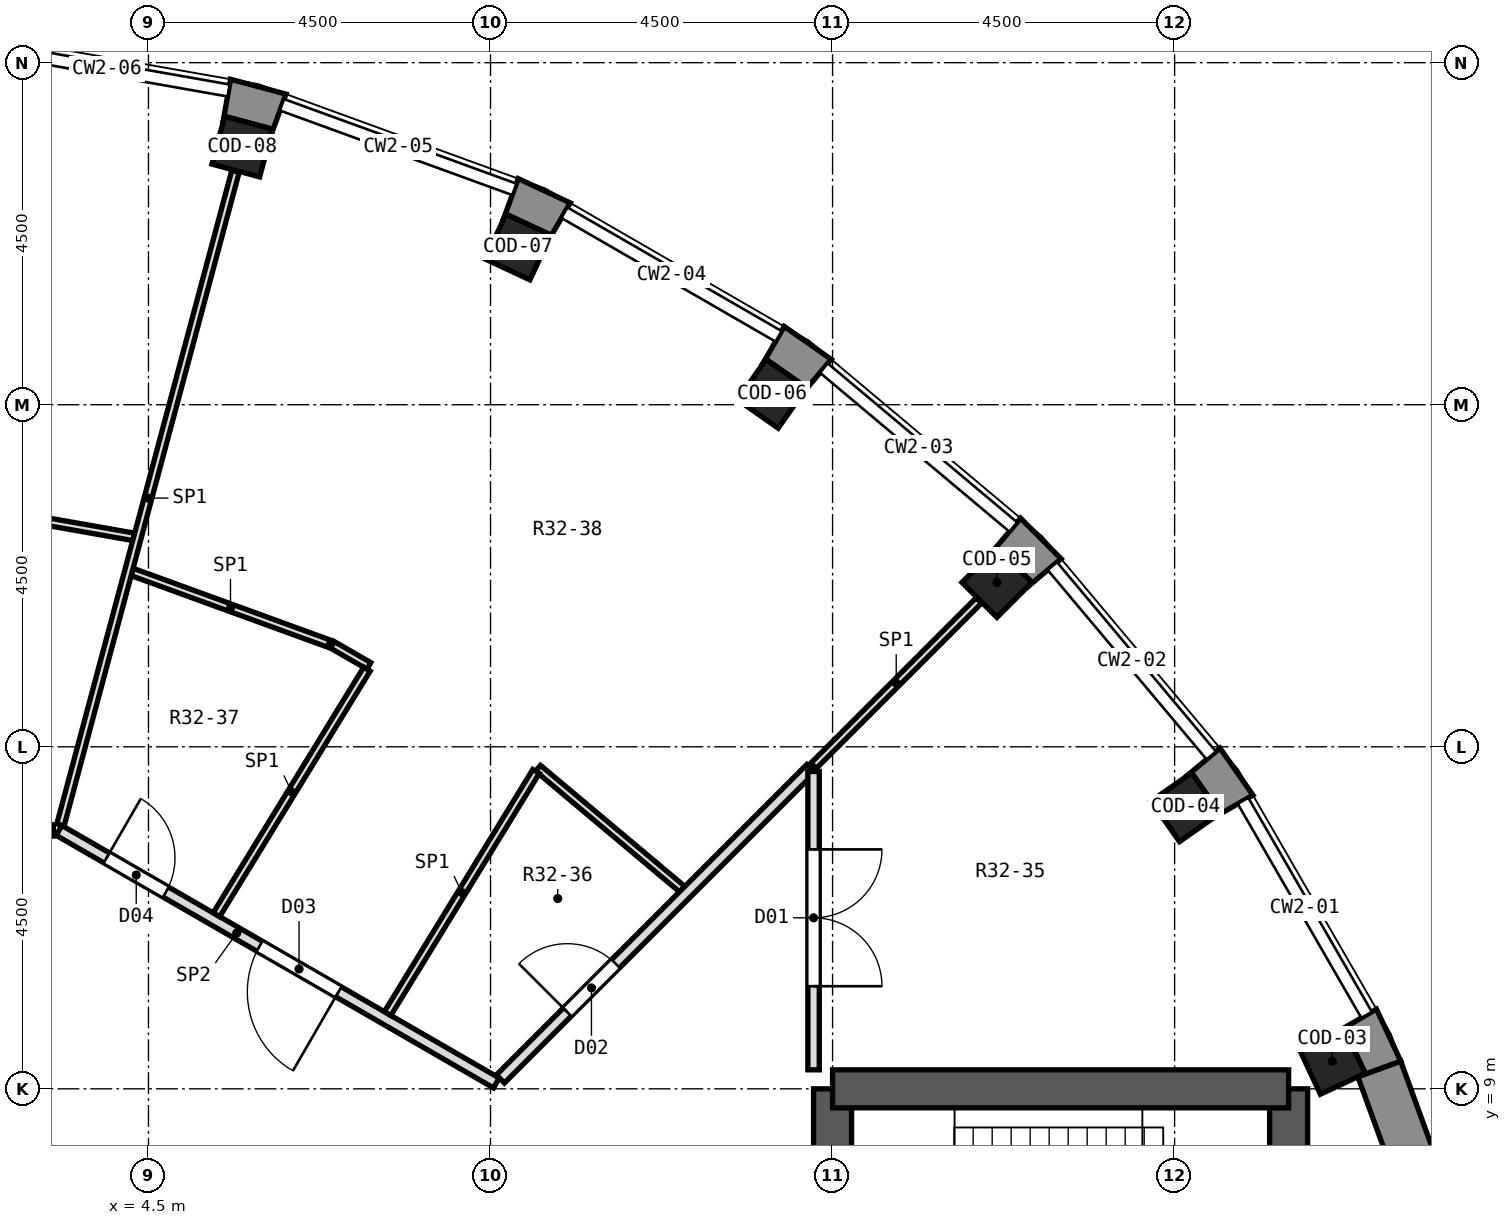
"""IFC4 building model, lengths in metres.
Left out: names, types, materials, properties, quantities, classifications, styles, units other than length and angle.
Written with IfcOpenShell. Run it as: python <this file> out.ifc"""

import sys

from ifc_helpers import new_model, si_unit, direction, frame, frame_2d, origin, origin_2d, place, context, subcontext, project, spatial, polyline, rectangle, outline, extrude, element, fill, save


model = new_model("IFC4")
c1 = context("Model", 3, precision=1e-05, world=origin(), true_north=direction((0.0, 1.0)))
c2 = subcontext(c1, "Body", "Model", "MODEL_VIEW")
j1 = project(units=[si_unit("LENGTHUNIT", "METRE"), si_unit("PLANEANGLEUNIT", "RADIAN")], contexts=[c1])
p1 = place(None, origin())
s1 = spatial("IfcSite", under=j1, at=p1, CompositionType="ELEMENT")
p2 = place(p1, origin())
s2 = spatial("IfcBuilding", under=s1, at=p2, CompositionType="ELEMENT")
p3 = place(p2, frame((0.0, 0.0, 224.7)))
s3 = spatial("IfcBuildingStorey", under=s2, at=p3, CompositionType="ELEMENT", Elevation=224.7)
for number, where, z_axis, x_axis in (
    (1, (20.075, 9.361, -0.55), (0.0, 0.0, 1.0), (0.906, 0.423, 0.0)),
    (2, (18.144, 12.705, -0.55), (0.0, 0.0, 1.0), (0.819, 0.574, 0.0)),
    (3, (15.662, 15.662, -0.55), (0.0, 0.0, 1.0), (0.707, 0.707, 0.0)),
    (4, (12.705, 18.144, -0.55), (0.0, 0.0, 1.0), (0.574, 0.819, 0.0)),
    (5, (9.361, 20.075, -0.55), (0.0, 0.0, 1.0), (0.423, 0.906, 0.0)),
    (6, (5.733, 21.395, -0.55), (0.0, 0.0, 1.0), (0.259, 0.966, 0.0)),
):
    element("IfcColumn", number, at=place(p3, frame(where, z_axis=z_axis, x_axis=x_axis)), inside=s3, PredefinedType="COLUMN", context=c2, shape_type="SweptSolid", body=[
        extrude(rectangle(XDim=0.65, YDim=0.65, at=origin_2d()), origin(), (0.0, 0.0, 1.0), 5.55),
    ])
p4 = place(p3, frame((13.5, -9.0, 0.0), z_axis=(0.0, 0.0, 1.0), x_axis=(0.0, 1.0, 0.0)))
e7 = element("IfcWall", 7, at=p4, inside=s3, PredefinedType="SHEAR", context=c2, shape_type="SweptSolid", body=[
    extrude(rectangle(XDim=18.0, YDim=0.5, at=frame_2d((9.0, 0.0))), origin(), (0.0, 0.0, 1.0), 5.0),
])
p5 = place(p4, frame((15.4, 0.0, 0.0)))
e8 = element("IfcOpeningElement", 8, at=p5, cuts=e7, PredefinedType="OPENING", context=c2, shape_type="SweptSolid", body=[
    extrude(rectangle(XDim=1.2, YDim=2.1, at=frame_2d((0.6, 1.05))), frame((0.0, 0.262, 0.0), z_axis=(0.0, -1.0, 0.0), x_axis=(1.0, 0.0, 0.0)), (0.0, 0.0, 1.0), 0.524),
])
p6 = place(p4, frame((1.4, 0.0, 0.0)))
e9 = element("IfcOpeningElement", 9, at=p6, cuts=e7, PredefinedType="OPENING", context=c2, shape_type="SweptSolid", body=[
    extrude(rectangle(XDim=1.2, YDim=2.1, at=frame_2d((0.6, 1.05))), frame((0.0, 0.262, 0.0), z_axis=(0.0, -1.0, 0.0), x_axis=(1.0, 0.0, 0.0)), (0.0, 0.0, 1.0), 0.524),
])
p7 = place(p4, frame((7.5, 0.0, 0.0)))
e10 = element("IfcOpeningElement", 10, at=p7, cuts=e7, PredefinedType="OPENING", context=c2, shape_type="SweptSolid", body=[
    extrude(rectangle(XDim=3.0, YDim=2.4, at=frame_2d((1.5, 1.2))), frame((0.0, 0.262, 0.0), z_axis=(0.0, -1.0, 0.0), x_axis=(1.0, 0.0, 0.0)), (0.0, 0.0, 1.0), 0.524),
])
p8 = place(p3, frame((19.5, -9.0, 0.0), z_axis=(0.0, 0.0, 1.0), x_axis=(0.0, 1.0, 0.0)))
e11 = element("IfcWall", 11, at=p8, inside=s3, PredefinedType="SHEAR", context=c2, shape_type="SweptSolid", body=[
    extrude(rectangle(XDim=18.0, YDim=0.5, at=frame_2d((9.0, 0.0))), origin(), (0.0, 0.0, 1.0), 5.0),
])
p9 = place(p8, frame((9.45, 0.0, 0.0)))
e12 = element("IfcOpeningElement", 12, at=p9, cuts=e11, PredefinedType="OPENING", context=c2, shape_type="SweptSolid", body=[
    extrude(rectangle(XDim=0.9, YDim=2.1, at=frame_2d((0.45, 1.05))), frame((0.0, 0.262, 0.0), z_axis=(0.0, -1.0, 0.0), x_axis=(1.0, 0.0, 0.0)), (0.0, 0.0, 1.0), 0.524),
])
p10 = place(p8, frame((7.65, 0.0, 0.0)))
e13 = element("IfcOpeningElement", 13, at=p10, cuts=e11, PredefinedType="OPENING", context=c2, shape_type="SweptSolid", body=[
    extrude(rectangle(XDim=0.9, YDim=2.1, at=frame_2d((0.45, 1.05))), frame((0.0, 0.262, 0.0), z_axis=(0.0, -1.0, 0.0), x_axis=(1.0, 0.0, 0.0)), (0.0, 0.0, 1.0), 0.524),
])
p11 = place(p3, frame((13.5, 9.0, 0.0), z_axis=(0.0, 0.0, 1.0), x_axis=(1.0, 0.0, 0.0)))
e14 = element("IfcWall", 14, at=p11, inside=s3, PredefinedType="SHEAR", context=c2, shape_type="SweptSolid", body=[
    extrude(rectangle(XDim=6.0, YDim=0.5, at=frame_2d((3.0, 0.0))), origin(), (0.0, 0.0, 1.0), 5.0),
])
p12 = place(p3, frame((21.805, 6.206, 0.0), z_axis=(0.0, 0.0, 1.0), x_axis=(-0.342056509473, 0.939679383794, 0.0)))
e15 = element("IfcWall", 15, at=p12, inside=s3, PredefinedType="SOLIDWALL", context=c2, shape_type="SweptSolid", body=[
    extrude(rectangle(XDim=3.252, YDim=0.6, at=frame_2d((1.626, 0.0))), origin(), (0.0, 0.0, 1.0), 4.6),
])
p13 = place(p3, origin())
e16 = element("IfcWall", 16, at=p13, inside=s3, PredefinedType="SOLIDWALL", context=c2, shape_type="SweptSolid", body=[
    extrude(outline(polyline([(20.975, 9.364), (20.656, 10.048), (20.136, 9.748), (20.232, 9.793), (20.507, 9.204), (20.411, 9.159), (20.975, 9.364)])), origin(), (0.0, 0.0, 1.0), 4.6),
])
p14 = place(p3, origin())
e17 = element("IfcWall", 17, at=p14, inside=s3, PredefinedType="SOLIDWALL", context=c2, shape_type="SweptSolid", body=[
    extrude(outline(polyline([(19.03, 12.864), (18.597, 13.482), (18.137, 13.097), (18.224, 13.157), (18.597, 12.625), (18.51, 12.564), (19.03, 12.864)])), origin(), (0.0, 0.0, 1.0), 4.6),
])
p15 = place(p3, origin())
e18 = element("IfcWall", 18, at=p15, inside=s3, PredefinedType="SOLIDWALL", context=c2, shape_type="SweptSolid", body=[
    extrude(outline(polyline([(15.973, 16.507), (15.588, 16.047), (15.662, 16.122), (16.122, 15.662), (16.047, 15.588), (16.507, 15.973), (15.973, 16.507)])), origin(), (0.0, 0.0, 1.0), 4.6),
])
p16 = place(p3, origin())
e19 = element("IfcWall", 19, at=p16, inside=s3, PredefinedType="SOLIDWALL", context=c2, shape_type="SweptSolid", body=[
    extrude(outline(polyline([(12.864, 19.03), (12.564, 18.51), (12.625, 18.597), (13.157, 18.224), (13.097, 18.137), (13.482, 18.597), (12.864, 19.03)])), origin(), (0.0, 0.0, 1.0), 4.6),
])
p17 = place(p3, origin())
e20 = element("IfcWall", 20, at=p17, inside=s3, PredefinedType="SOLIDWALL", context=c2, shape_type="SweptSolid", body=[
    extrude(outline(polyline([(10.048, 20.656), (9.364, 20.975), (9.159, 20.411), (9.204, 20.507), (9.793, 20.232), (9.748, 20.136), (10.048, 20.656)])), origin(), (0.0, 0.0, 1.0), 4.6),
])
p18 = place(p3, origin())
e21 = element("IfcWall", 21, at=p18, inside=s3, PredefinedType="SOLIDWALL", context=c2, shape_type="SweptSolid", body=[
    extrude(outline(polyline([(5.58, 22.282), (5.476, 21.691), (5.503, 21.793), (6.131, 21.625), (6.104, 21.523), (6.309, 22.087), (5.58, 22.282)])), origin(), (0.0, 0.0, 1.0), 4.6),
])
p19 = place(p3, frame((9.625, 13.218, 0.0), z_axis=(0.0, 0.0, 1.0), x_axis=(0.766147679589, -0.642664557184, 0.0)))
e22 = element("IfcWall", 22, at=p19, inside=s3, PredefinedType="PARTITIONING", context=c2, shape_type="SweptSolid", body=[
    extrude(rectangle(XDim=2.475, YDim=0.1, at=frame_2d((1.238, 0.0))), origin(), (0.0, 0.0, 1.0), 4.6),
])
p20 = place(p3, frame((3.323, 12.4, 0.0), z_axis=(0.0, 0.0, 1.0), x_axis=(0.865961614908, -0.500110469302, 0.0)))
e23 = element("IfcWall", 23, at=p20, inside=s3, PredefinedType="PARTITIONING", context=c2, shape_type="SweptSolid", body=[
    extrude(rectangle(XDim=6.645, YDim=0.15, at=frame_2d((3.322, 0.0))), origin(), (0.0, 0.0, 1.0), 4.6),
])
p21 = place(p20, frame((3.047, 0.0, 0.0)))
e24 = element("IfcOpeningElement", 24, at=p21, cuts=e23, PredefinedType="OPENING", context=c2, shape_type="SweptSolid", body=[
    extrude(rectangle(XDim=1.2, YDim=2.1, at=frame_2d((0.6, 1.05))), frame((0.0, 0.087, 0.0), z_axis=(0.0, -1.0, 0.0), x_axis=(1.0, 0.0, 0.0)), (0.0, 0.0, 1.0), 0.174),
])
p22 = place(p20, frame((0.723, 0.0, 0.0)))
e25 = element("IfcOpeningElement", 25, at=p22, cuts=e23, PredefinedType="OPENING", context=c2, shape_type="SweptSolid", body=[
    extrude(rectangle(XDim=0.9, YDim=2.1, at=frame_2d((0.45, 1.05))), frame((0.0, 0.087, 0.0), z_axis=(0.0, -1.0, 0.0), x_axis=(1.0, 0.0, 0.0)), (0.0, 0.0, 1.0), 0.174),
])
p23 = place(p3, frame((6.92, 14.841, 0.0), z_axis=(0.0, 0.0, 1.0), x_axis=(0.866038875684, -0.49997666526, 0.0)))
e26 = element("IfcWall", 26, at=p23, inside=s3, PredefinedType="PARTITIONING", context=c2, shape_type="SweptSolid", body=[
    extrude(rectangle(XDim=0.554, YDim=0.1, at=frame_2d((0.277, 0.0))), origin(), (0.0, 0.0, 1.0), 4.6),
])
p24 = place(p3, frame((4.285, 15.8, 0.0), z_axis=(0.0, 0.0, 1.0), x_axis=(0.93973388068, -0.341906761417, 0.0)))
e27 = element("IfcWall", 27, at=p24, inside=s3, PredefinedType="PARTITIONING", context=c2, shape_type="SweptSolid", body=[
    extrude(rectangle(XDim=2.754, YDim=0.1, at=frame_2d((1.377, 0.0))), origin(), (0.0, 0.0, 1.0), 4.6),
])
p25 = place(p3, frame((1.467, 16.762, 0.0), z_axis=(0.0, 0.0, 1.0), x_axis=(0.984824461094, -0.173553394752, 0.0)))
e28 = element("IfcWall", 28, at=p25, inside=s3, PredefinedType="PARTITIONING", context=c2, shape_type="SweptSolid", body=[
    extrude(rectangle(XDim=2.882, YDim=0.1, at=frame_2d((1.441, 0.0))), origin(), (0.0, 0.0, 1.0), 4.6),
])
p26 = place(p3, frame((-3.273, 12.4, 0.0), z_axis=(0.0, 0.0, 1.0), x_axis=(1.0, 0.0, 0.0)))
e29 = element("IfcWall", 29, at=p26, inside=s3, PredefinedType="PARTITIONING", context=c2, shape_type="SweptSolid", body=[
    extrude(rectangle(XDim=6.521, YDim=0.15, at=frame_2d((3.26, 0.0))), origin(), (0.0, 0.0, 1.0), 4.6),
])
p27 = place(p26, frame((5.135, 0.0, 0.0)))
e30 = element("IfcOpeningElement", 30, at=p27, cuts=e29, PredefinedType="OPENING", context=c2, shape_type="SweptSolid", body=[
    extrude(rectangle(XDim=0.9, YDim=2.1, at=frame_2d((0.45, 1.05))), frame((0.0, 0.087, 0.0), z_axis=(0.0, -1.0, 0.0), x_axis=(1.0, 0.0, 0.0)), (0.0, 0.0, 1.0), 0.174),
])
p28 = place(p26, frame((2.673, 0.0, 0.0)))
e31 = element("IfcOpeningElement", 31, at=p28, cuts=e29, PredefinedType="OPENING", context=c2, shape_type="SweptSolid", body=[
    extrude(rectangle(XDim=1.2, YDim=2.1, at=frame_2d((0.6, 1.05))), frame((0.0, 0.087, 0.0), z_axis=(0.0, -1.0, 0.0), x_axis=(1.0, 0.0, 0.0)), (0.0, 0.0, 1.0), 0.174),
])
p29 = place(p26, frame((0.511, 0.0, 0.0)))
e32 = element("IfcOpeningElement", 32, at=p29, cuts=e29, PredefinedType="OPENING", context=c2, shape_type="SweptSolid", body=[
    extrude(rectangle(XDim=0.9, YDim=2.1, at=frame_2d((0.45, 1.05))), frame((0.0, 0.087, 0.0), z_axis=(0.0, -1.0, 0.0), x_axis=(1.0, 0.0, 0.0)), (0.0, 0.0, 1.0), 0.174),
])
p30 = place(p3, frame((13.25, 13.25, 0.0), z_axis=(0.0, 0.0, 1.0), x_axis=(0.707106781187, 0.707106781187, 0.0)))
e33 = element("IfcWall", 33, at=p30, inside=s3, PredefinedType="PARTITIONING", context=c2, shape_type="SweptSolid", body=[
    extrude(rectangle(XDim=3.077, YDim=0.1, at=frame_2d((1.538, 0.0))), origin(), (0.0, 0.0, 1.0), 4.6),
])
p31 = place(p3, frame((9.13, 9.13, 0.0), z_axis=(0.0, 0.0, 1.0), x_axis=(0.707106781187, 0.707106781187, 0.0)))
e34 = element("IfcWall", 34, at=p31, inside=s3, PredefinedType="PARTITIONING", context=c2, shape_type="SweptSolid", body=[
    extrude(rectangle(XDim=5.777, YDim=0.15, at=frame_2d((2.888, 0.0))), origin(), (0.0, 0.0, 1.0), 4.6),
])
p32 = place(p31, frame((1.244, 0.0, 0.0)))
e35 = element("IfcOpeningElement", 35, at=p32, cuts=e34, PredefinedType="OPENING", context=c2, shape_type="SweptSolid", body=[
    extrude(rectangle(XDim=0.9, YDim=2.1, at=frame_2d((0.45, 1.05))), frame((0.0, 0.087, 0.0), z_axis=(0.0, -1.0, 0.0), x_axis=(1.0, 0.0, 0.0)), (0.0, 0.0, 1.0), 0.174),
])
p33 = place(p3, frame((7.646, 9.99, 0.0), z_axis=(0.0, 0.0, 1.0), x_axis=(0.522631009754, 0.852558987779, 0.0)))
e36 = element("IfcWall", 36, at=p33, inside=s3, PredefinedType="PARTITIONING", context=c2, shape_type="SweptSolid", body=[
    extrude(rectangle(XDim=3.736, YDim=0.1, at=frame_2d((1.868, 0.0))), origin(), (0.0, 0.0, 1.0), 4.6),
])
p34 = place(p3, frame((5.394, 11.291, 0.0), z_axis=(0.0, 0.0, 1.0), x_axis=(0.522471391937, 0.852656815259, 0.0)))
e37 = element("IfcWall", 37, at=p34, inside=s3, PredefinedType="PARTITIONING", context=c2, shape_type="SweptSolid", body=[
    extrude(rectangle(XDim=3.789, YDim=0.1, at=frame_2d((1.895, 0.0))), origin(), (0.0, 0.0, 1.0), 4.6),
])
p35 = place(p3, frame((3.342, 12.472, 0.0), z_axis=(0.0, 0.0, 1.0), x_axis=(0.258684909749, 0.965961757767, 0.0)))
e38 = element("IfcWall", 38, at=p35, inside=s3, PredefinedType="PARTITIONING", context=c2, shape_type="SweptSolid", body=[
    extrude(rectangle(XDim=8.903, YDim=0.1, at=frame_2d((4.451, 0.0))), origin(), (0.0, 0.0, 1.0), 4.6),
])
p36 = place(p3, frame((13.25, 9.25, 0.0), z_axis=(0.0, 0.0, 1.0), x_axis=(0.0, 1.0, 0.0)))
e39 = element("IfcWall", 39, at=p36, inside=s3, PredefinedType="PARTITIONING", context=c2, shape_type="SweptSolid", body=[
    extrude(rectangle(XDim=3.925, YDim=0.15, at=frame_2d((1.962, 0.0))), origin(), (0.0, 0.0, 1.0), 4.6),
])
p37 = place(p36, frame((1.1, 0.0, 0.0)))
e40 = element("IfcOpeningElement", 40, at=p37, cuts=e39, PredefinedType="OPENING", context=c2, shape_type="SweptSolid", body=[
    extrude(rectangle(XDim=1.8, YDim=2.1, at=frame_2d((0.9, 1.05))), frame((0.0, 0.087, 0.0), z_axis=(0.0, -1.0, 0.0), x_axis=(1.0, 0.0, 0.0)), (0.0, 0.0, 1.0), 0.174),
])
p38 = place(p37, frame((1.8, 0.0, 0.0), z_axis=(0.0, 0.0, 1.0), x_axis=(-1.0, 0.0, 0.0)))
e41 = element("IfcDoor", 41, at=p38, inside=s3, OperationType="DOUBLE_DOOR_SINGLE_SWING", PredefinedType="DOOR", context=c2, shape_type="SweptSolid", body=[
    extrude(rectangle(XDim=1.8, YDim=2.1, at=frame_2d((0.9, 1.05))), frame((0.0, 0.025, 0.0), z_axis=(0.0, -1.0, 0.0), x_axis=(1.0, 0.0, 0.0)), (0.0, 0.0, 1.0), 0.05),
])
fill(e40, e41)
p39 = place(p32, origin())
e42 = element("IfcDoor", 42, at=p39, inside=s3, OperationType="SINGLE_SWING_LEFT", PredefinedType="DOOR", context=c2, shape_type="SweptSolid", body=[
    extrude(rectangle(XDim=0.9, YDim=2.1, at=frame_2d((0.45, 1.05))), frame((0.0, 0.025, 0.0), z_axis=(0.0, -1.0, 0.0), x_axis=(1.0, 0.0, 0.0)), (0.0, 0.0, 1.0), 0.05),
])
fill(e35, e42)
p40 = place(p21, frame((1.2, 0.0, 0.0), z_axis=(0.0, 0.0, 1.0), x_axis=(-1.0, 0.0, 0.0)))
e43 = element("IfcDoor", 43, at=p40, inside=s3, OperationType="SINGLE_SWING_LEFT", PredefinedType="DOOR", context=c2, shape_type="SweptSolid", body=[
    extrude(rectangle(XDim=1.2, YDim=2.1, at=frame_2d((0.6, 1.05))), frame((0.0, 0.025, 0.0), z_axis=(0.0, -1.0, 0.0), x_axis=(1.0, 0.0, 0.0)), (0.0, 0.0, 1.0), 0.05),
])
fill(e24, e43)
p41 = place(p22, origin())
e44 = element("IfcDoor", 44, at=p41, inside=s3, OperationType="SINGLE_SWING_LEFT", PredefinedType="DOOR", context=c2, shape_type="SweptSolid", body=[
    extrude(rectangle(XDim=0.9, YDim=2.1, at=frame_2d((0.45, 1.05))), frame((0.0, 0.025, 0.0), z_axis=(0.0, -1.0, 0.0), x_axis=(1.0, 0.0, 0.0)), (0.0, 0.0, 1.0), 0.05),
])
fill(e25, e44)
save(model, sys.argv[1])
